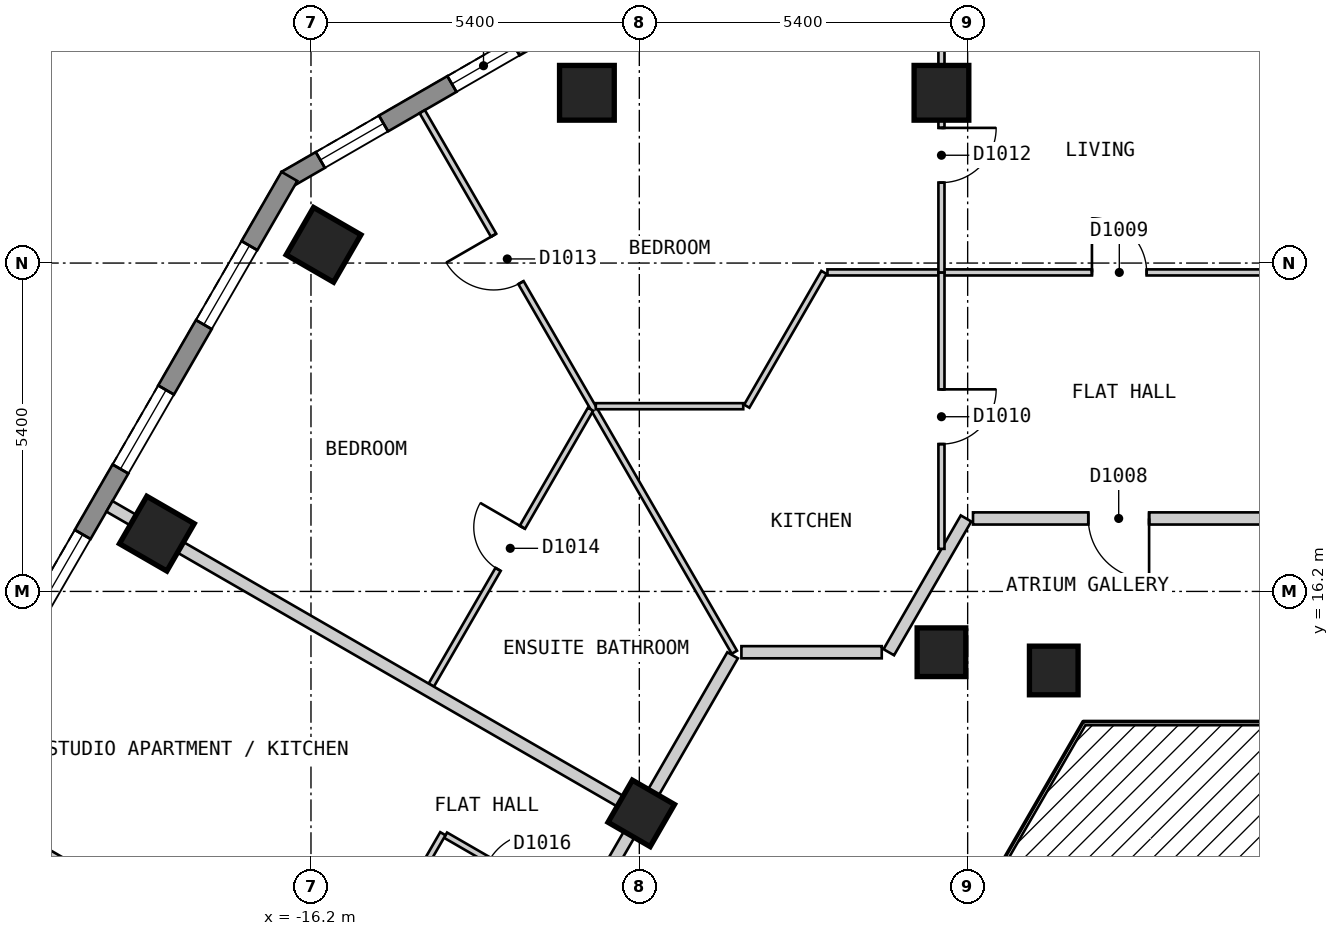
"""IFC4 building model, lengths in metres.
Left out: names, types, materials, properties, quantities, classifications, styles, units other than length and angle.
Written with IfcOpenShell. Run it as: python <this file> out.ifc"""

import sys

from ifc_helpers import new_model, si_unit, direction, frame, frame_2d, origin, origin_2d, place, context, subcontext, project, spatial, polyline, rectangle, outline, extrude, element, fill, save


model = new_model("IFC4")
c1 = context("Model", 3, precision=1e-05, world=origin(), true_north=direction((0.0, 1.0)))
c2 = subcontext(c1, "Body", "Model", "MODEL_VIEW")
j1 = project(units=[si_unit("LENGTHUNIT", "METRE"), si_unit("PLANEANGLEUNIT", "RADIAN")], contexts=[c1])
p1 = place(None, origin())
s1 = spatial("IfcSite", under=j1, at=p1, CompositionType="ELEMENT")
p2 = place(p1, origin())
s2 = spatial("IfcBuilding", under=s1, at=p2, CompositionType="ELEMENT")
p3 = place(p2, frame((0.0, 0.0, 126.6)))
s3 = spatial("IfcBuildingStorey", under=s2, at=p3, CompositionType="ELEMENT", Elevation=126.6)
for number, where, z_axis, x_axis in (
    (1, (-5.831, 24.4, 0.0), (0.0, 0.0, 1.0), (-1.0, 0.0, 0.0)),
    (2, (-11.662, 24.4, 0.0), (0.0, 0.0, 1.0), (-1.0, 0.0, 0.0)),
    (3, (-15.993, 21.9, 0.0), (0.0, 0.0, 1.0), (-0.5, -0.866, 0.0)),
    (4, (-18.735, 17.15, 0.0), (0.0, 0.0, 1.0), (-0.5, -0.866, 0.0)),
):
    element("IfcColumn", number, at=place(p3, frame(where, z_axis=z_axis, x_axis=x_axis)), inside=s3, PredefinedType="COLUMN", context=c2, shape_type="SweptSolid", body=[
        extrude(rectangle(XDim=0.9, YDim=0.9, at=origin_2d()), origin(), (0.0, 0.0, 1.0), 3.0),
    ])
for number, where, z_axis, x_axis in (
    (5, (-3.984, 14.9, 0.0), (0.0, 0.0, 1.0), (1.0, 0.0, 0.0)),
    (6, (-5.831, 15.2, 0.0), (0.0, 0.0, 1.0), (-1.0, 0.0, 0.0)),
    (7, (-10.768, 12.55, 0.0), (0.0, 0.0, 1.0), (-0.5, -0.866, 0.0)),
):
    element("IfcColumn", number, at=place(p3, frame(where, z_axis=z_axis, x_axis=x_axis)), inside=s3, PredefinedType="COLUMN", context=c2, shape_type="SweptSolid", body=[
        extrude(rectangle(XDim=0.8, YDim=0.8, at=origin_2d()), origin(), (0.0, 0.0, 1.0), 3.0),
    ])
p4 = place(p3, frame((-12.28, 25.47, 0.0), z_axis=(0.0, 0.0, 1.0), x_axis=(-0.866022959057, -0.500004234368, 0.0)))
e8 = element("IfcWall", 8, at=p4, inside=s3, PredefinedType="SOLIDWALL", context=c2, shape_type="SweptSolid", body=[
    extrude(outline(polyline([(0.0, -0.15), (5.0, -0.15), (4.92, 0.15), (0.08, 0.15), (0.0, -0.15)])), origin(), (0.0, 0.0, 1.0), 2.7),
])
p5 = place(p4, frame((0.65, 0.0, 0.15)))
e9 = element("IfcOpeningElement", 9, at=p5, cuts=e8, PredefinedType="OPENING", context=c2, shape_type="SweptSolid", body=[
    extrude(rectangle(XDim=1.2, YDim=2.1, at=frame_2d((0.6, 1.05))), frame((0.0, 0.16, 0.0), z_axis=(0.0, -1.0, 0.0), x_axis=(1.0, 0.0, 0.0)), (0.0, 0.0, 1.0), 0.32),
])
p6 = place(p4, frame((3.149, 0.0, 0.15)))
e10 = element("IfcOpeningElement", 10, at=p6, cuts=e8, PredefinedType="OPENING", context=c2, shape_type="SweptSolid", body=[
    extrude(rectangle(XDim=1.2, YDim=2.1, at=frame_2d((0.6, 1.05))), frame((0.0, 0.16, 0.0), z_axis=(0.0, -1.0, 0.0), x_axis=(1.0, 0.0, 0.0)), (0.0, 0.0, 1.0), 0.32),
])
p7 = place(p3, frame((-16.555, 23.025, 0.0), z_axis=(0.0, 0.0, 1.0), x_axis=(-0.500020536353, -0.866013546791, 0.0)))
e11 = element("IfcWall", 11, at=p7, inside=s3, PredefinedType="SOLIDWALL", context=c2, shape_type="SweptSolid", body=[
    extrude(outline(polyline([(0.0, -0.15), (23.325, -0.15), (23.245, 0.15), (0.08, 0.15), (0.0, -0.15)])), origin(), (0.0, 0.0, 1.0), 2.7),
])
p8 = place(p7, frame((1.314, 0.0, 0.15)))
e12 = element("IfcOpeningElement", 12, at=p8, cuts=e11, PredefinedType="OPENING", context=c2, shape_type="SweptSolid", body=[
    extrude(rectangle(XDim=1.5, YDim=2.1, at=frame_2d((0.75, 1.05))), frame((0.0, 0.16, 0.0), z_axis=(0.0, -1.0, 0.0), x_axis=(1.0, 0.0, 0.0)), (0.0, 0.0, 1.0), 0.32),
])
p9 = place(p7, frame((4.056, 0.0, 0.15)))
e13 = element("IfcOpeningElement", 13, at=p9, cuts=e11, PredefinedType="OPENING", context=c2, shape_type="SweptSolid", body=[
    extrude(rectangle(XDim=1.5, YDim=2.1, at=frame_2d((0.75, 1.05))), frame((0.0, 0.16, 0.0), z_axis=(0.0, -1.0, 0.0), x_axis=(1.0, 0.0, 0.0)), (0.0, 0.0, 1.0), 0.32),
])
p10 = place(p7, frame((6.799, 0.0, 0.15)))
e14 = element("IfcOpeningElement", 14, at=p10, cuts=e11, PredefinedType="OPENING", context=c2, shape_type="SweptSolid", body=[
    extrude(rectangle(XDim=1.5, YDim=2.1, at=frame_2d((0.75, 1.05))), frame((0.0, 0.16, 0.0), z_axis=(0.0, -1.0, 0.0), x_axis=(1.0, 0.0, 0.0)), (0.0, 0.0, 1.0), 0.32),
])
p11 = place(p7, frame((9.541, 0.0, 0.15)))
e15 = element("IfcOpeningElement", 15, at=p11, cuts=e11, PredefinedType="OPENING", context=c2, shape_type="SweptSolid", body=[
    extrude(rectangle(XDim=1.5, YDim=2.1, at=frame_2d((0.75, 1.05))), frame((0.0, 0.16, 0.0), z_axis=(0.0, -1.0, 0.0), x_axis=(1.0, 0.0, 0.0)), (0.0, 0.0, 1.0), 0.32),
])
p12 = place(p7, frame((12.285, 0.0, 0.15)))
e16 = element("IfcOpeningElement", 16, at=p12, cuts=e11, PredefinedType="OPENING", context=c2, shape_type="SweptSolid", body=[
    extrude(rectangle(XDim=1.5, YDim=2.1, at=frame_2d((0.75, 1.05))), frame((0.0, 0.16, 0.0), z_axis=(0.0, -1.0, 0.0), x_axis=(1.0, 0.0, 0.0)), (0.0, 0.0, 1.0), 0.32),
])
p13 = place(p7, frame((15.027, 0.0, 0.15)))
e17 = element("IfcOpeningElement", 17, at=p13, cuts=e11, PredefinedType="OPENING", context=c2, shape_type="SweptSolid", body=[
    extrude(rectangle(XDim=1.5, YDim=2.1, at=frame_2d((0.75, 1.05))), frame((0.0, 0.16, 0.0), z_axis=(0.0, -1.0, 0.0), x_axis=(1.0, 0.0, 0.0)), (0.0, 0.0, 1.0), 0.32),
])
p14 = place(p7, frame((17.769, 0.0, 0.15)))
e18 = element("IfcOpeningElement", 18, at=p14, cuts=e11, PredefinedType="OPENING", context=c2, shape_type="SweptSolid", body=[
    extrude(rectangle(XDim=1.5, YDim=2.1, at=frame_2d((0.75, 1.05))), frame((0.0, 0.16, 0.0), z_axis=(0.0, -1.0, 0.0), x_axis=(1.0, 0.0, 0.0)), (0.0, 0.0, 1.0), 0.32),
])
p15 = place(p7, frame((20.512, 0.0, 0.15)))
e19 = element("IfcOpeningElement", 19, at=p15, cuts=e11, PredefinedType="OPENING", context=c2, shape_type="SweptSolid", body=[
    extrude(rectangle(XDim=1.5, YDim=2.1, at=frame_2d((0.75, 1.05))), frame((0.0, 0.16, 0.0), z_axis=(0.0, -1.0, 0.0), x_axis=(1.0, 0.0, 0.0)), (0.0, 0.0, 1.0), 0.32),
])
p16 = place(p3, frame((-9.121, 15.2, 0.0), z_axis=(0.0, 0.0, 1.0), x_axis=(1.0, 0.0, 0.0)))
e20 = element("IfcWall", 20, at=p16, inside=s3, PredefinedType="PARTITIONING", context=c2, shape_type="SweptSolid", body=[
    extrude(rectangle(XDim=2.308, YDim=0.2, at=frame_2d((1.154, 0.0))), origin(), (0.0, 0.0, 1.0), 2.7),
])
p17 = place(p3, frame((-5.312, 17.4, 0.0), z_axis=(0.0, 0.0, 1.0), x_axis=(1.0, 0.0, 0.0)))
e21 = element("IfcWall", 21, at=p17, inside=s3, PredefinedType="PARTITIONING", context=c2, shape_type="SweptSolid", body=[
    extrude(rectangle(XDim=10.739, YDim=0.2, at=frame_2d((5.37, 0.0))), origin(), (0.0, 0.0, 1.0), 2.7),
])
p18 = place(p17, frame((1.896, 0.0, 0.0)))
e22 = element("IfcOpeningElement", 22, at=p18, cuts=e21, PredefinedType="OPENING", context=c2, shape_type="SweptSolid", body=[
    extrude(rectangle(XDim=1.0, YDim=2.1, at=frame_2d((0.5, 1.05))), frame((0.0, 0.11, 0.0), z_axis=(0.0, -1.0, 0.0), x_axis=(1.0, 0.0, 0.0)), (0.0, 0.0, 1.0), 0.22),
])
p19 = place(p3, frame((-6.697, 15.2, 0.0), z_axis=(0.0, 0.0, 1.0), x_axis=(0.499963722229, 0.866046347752, 0.0)))
e23 = element("IfcWall", 23, at=p19, inside=s3, PredefinedType="PARTITIONING", context=c2, shape_type="SweptSolid", body=[
    extrude(rectangle(XDim=2.54, YDim=0.2, at=frame_2d((1.27, 0.0))), origin(), (0.0, 0.0, 1.0), 2.7),
])
p20 = place(p3, frame((-17.753, 0.45, 0.0), z_axis=(0.0, 0.0, 1.0), x_axis=(0.499990970252, 0.866030617049, 0.0)))
e24 = element("IfcWall", 24, at=p20, inside=s3, PredefinedType="PARTITIONING", context=c2, shape_type="SweptSolid", body=[
    extrude(rectangle(XDim=16.974, YDim=0.2, at=frame_2d((8.487, 0.0))), origin(), (0.0, 0.0, 1.0), 2.7),
])
p21 = place(p20, frame((10.73, 0.0, 0.0)))
e25 = element("IfcOpeningElement", 25, at=p21, cuts=e24, PredefinedType="OPENING", context=c2, shape_type="SweptSolid", body=[
    extrude(rectangle(XDim=1.0, YDim=2.1, at=frame_2d((0.5, 1.05))), frame((0.0, 0.11, 0.0), z_axis=(0.0, -1.0, 0.0), x_axis=(1.0, 0.0, 0.0)), (0.0, 0.0, 1.0), 0.22),
])
p22 = place(p20, frame((5.245, 0.0, 0.0)))
e26 = element("IfcOpeningElement", 26, at=p22, cuts=e24, PredefinedType="OPENING", context=c2, shape_type="SweptSolid", body=[
    extrude(rectangle(XDim=1.0, YDim=2.1, at=frame_2d((0.5, 1.05))), frame((0.0, 0.11, 0.0), z_axis=(0.0, -1.0, 0.0), x_axis=(1.0, 0.0, 0.0)), (0.0, 0.0, 1.0), 0.22),
])
p23 = place(p20, frame((0.594, 0.0, 0.0)))
e27 = element("IfcOpeningElement", 27, at=p23, cuts=e24, PredefinedType="OPENING", context=c2, shape_type="SweptSolid", body=[
    extrude(rectangle(XDim=1.0, YDim=2.1, at=frame_2d((0.5, 1.05))), frame((0.0, 0.11, 0.0), z_axis=(0.0, -1.0, 0.0), x_axis=(1.0, 0.0, 0.0)), (0.0, 0.0, 1.0), 0.22),
])
p24 = place(p3, frame((-14.37, 24.09, 0.0), z_axis=(0.0, 0.0, 1.0), x_axis=(0.50002438799, -0.866011322914, 0.0)))
e28 = element("IfcWall", 28, at=p24, inside=s3, PredefinedType="PARTITIONING", context=c2, shape_type="SweptSolid", body=[
    extrude(rectangle(XDim=10.266, YDim=0.1, at=frame_2d((5.133, 0.0))), origin(), (0.0, 0.0, 1.0), 2.7),
])
p25 = place(p24, frame((2.347, 0.0, 0.0)))
e29 = element("IfcOpeningElement", 29, at=p25, cuts=e28, PredefinedType="OPENING", context=c2, shape_type="SweptSolid", body=[
    extrude(rectangle(XDim=0.9, YDim=2.1, at=frame_2d((0.45, 1.05))), frame((0.0, 0.06, 0.0), z_axis=(0.0, -1.0, 0.0), x_axis=(1.0, 0.0, 0.0)), (0.0, 0.0, 1.0), 0.12),
])
p26 = place(p3, frame((-13.987, 12.192, 0.0), z_axis=(0.0, 0.0, 1.0), x_axis=(0.865983051302, -0.500073349477, 0.0)))
e30 = element("IfcWall", 30, at=p26, inside=s3, PredefinedType="PARTITIONING", context=c2, shape_type="SweptSolid", body=[
    extrude(rectangle(XDim=2.509, YDim=0.1, at=frame_2d((1.255, 0.0))), origin(), (0.0, 0.0, 1.0), 2.7),
])
p27 = place(p26, frame((0.829, 0.0, 0.0)))
e31 = element("IfcOpeningElement", 31, at=p27, cuts=e30, PredefinedType="OPENING", context=c2, shape_type="SweptSolid", body=[
    extrude(rectangle(XDim=0.9, YDim=2.1, at=frame_2d((0.45, 1.05))), frame((0.0, 0.06, 0.0), z_axis=(0.0, -1.0, 0.0), x_axis=(1.0, 0.0, 0.0)), (0.0, 0.0, 1.0), 0.12),
])
p28 = place(p3, frame((-11.516, 19.246, 0.0), z_axis=(0.0, 0.0, 1.0), x_axis=(1.0, 0.0, 0.0)))
e32 = element("IfcWall", 32, at=p28, inside=s3, PredefinedType="PARTITIONING", context=c2, shape_type="SweptSolid", body=[
    extrude(rectangle(XDim=2.425, YDim=0.1, at=frame_2d((1.212, 0.0))), origin(), (0.0, 0.0, 1.0), 2.7),
])
p29 = place(p3, frame((-7.706, 21.446, 0.0), z_axis=(0.0, 0.0, 1.0), x_axis=(1.0, 0.0, 0.0)))
e33 = element("IfcWall", 33, at=p29, inside=s3, PredefinedType="PARTITIONING", context=c2, shape_type="SweptSolid", body=[
    extrude(rectangle(XDim=13.537, YDim=0.1, at=frame_2d((6.769, 0.0))), origin(), (0.0, 0.0, 1.0), 2.7),
])
p30 = place(p29, frame((4.35, 0.0, 0.0)))
e34 = element("IfcOpeningElement", 34, at=p30, cuts=e33, PredefinedType="OPENING", context=c2, shape_type="SweptSolid", body=[
    extrude(rectangle(XDim=0.9, YDim=2.1, at=frame_2d((0.45, 1.05))), frame((0.0, 0.06, 0.0), z_axis=(0.0, -1.0, 0.0), x_axis=(1.0, 0.0, 0.0)), (0.0, 0.0, 1.0), 0.12),
])
p31 = place(p3, frame((-9.033, 19.246, 0.0), z_axis=(0.0, 0.0, 1.0), x_axis=(0.499963722229, 0.866046347752, 0.0)))
e35 = element("IfcWall", 35, at=p31, inside=s3, PredefinedType="PARTITIONING", context=c2, shape_type="SweptSolid", body=[
    extrude(rectangle(XDim=2.54, YDim=0.1, at=frame_2d((1.27, 0.0))), origin(), (0.0, 0.0, 1.0), 2.7),
])
p32 = place(p3, frame((-15.763, 9.217, 0.0), z_axis=(0.0, 0.0, 1.0), x_axis=(0.500096714907, 0.865969558206, 0.0)))
e36 = element("IfcWall", 36, at=p32, inside=s3, PredefinedType="PARTITIONING", context=c2, shape_type="SweptSolid", body=[
    extrude(rectangle(XDim=3.463, YDim=0.1, at=frame_2d((1.731, 0.0))), origin(), (0.0, 0.0, 1.0), 2.7),
])
p33 = place(p3, frame((-14.222, 14.659, 0.0), z_axis=(0.0, 0.0, 1.0), x_axis=(0.500053212623, 0.865994679283, 0.0)))
e37 = element("IfcWall", 37, at=p33, inside=s3, PredefinedType="PARTITIONING", context=c2, shape_type="SweptSolid", body=[
    extrude(rectangle(XDim=5.239, YDim=0.1, at=frame_2d((2.62, 0.0))), origin(), (0.0, 0.0, 1.0), 2.7),
])
p34 = place(p33, frame((2.198, 0.0, 0.0)))
e38 = element("IfcOpeningElement", 38, at=p34, cuts=e37, PredefinedType="OPENING", context=c2, shape_type="SweptSolid", body=[
    extrude(rectangle(XDim=0.8, YDim=2.1, at=frame_2d((0.4, 1.05))), frame((0.0, 0.06, 0.0), z_axis=(0.0, -1.0, 0.0), x_axis=(1.0, 0.0, 0.0)), (0.0, 0.0, 1.0), 0.12),
])
p35 = place(p3, frame((-5.831, 16.9, 0.0), z_axis=(0.0, 0.0, 1.0), x_axis=(0.0, 1.0, 0.0)))
e39 = element("IfcWall", 39, at=p35, inside=s3, PredefinedType="PARTITIONING", context=c2, shape_type="SweptSolid", body=[
    extrude(rectangle(XDim=4.546, YDim=0.1, at=frame_2d((2.273, 0.0))), origin(), (0.0, 0.0, 1.0), 2.7),
])
p36 = place(p35, frame((1.723, 0.0, 0.0)))
e40 = element("IfcOpeningElement", 40, at=p36, cuts=e39, PredefinedType="OPENING", context=c2, shape_type="SweptSolid", body=[
    extrude(rectangle(XDim=0.9, YDim=2.1, at=frame_2d((0.45, 1.05))), frame((0.0, 0.06, 0.0), z_axis=(0.0, -1.0, 0.0), x_axis=(1.0, 0.0, 0.0)), (0.0, 0.0, 1.0), 0.12),
])
p37 = place(p3, frame((-22.257, 12.85, 0.0), z_axis=(0.0, 0.0, 1.0), x_axis=(0.866047370643, -0.499961950354, 0.0)))
e41 = element("IfcWall", 41, at=p37, inside=s3, PredefinedType="PARTITIONING", context=c2, shape_type="SweptSolid", body=[
    extrude(rectangle(XDim=10.001, YDim=0.2, at=frame_2d((5.0, 0.0))), origin(), (0.0, 0.0, 1.0), 2.7),
])
p38 = place(p3, frame((-19.514, 17.599, 0.0), z_axis=(0.0, 0.0, 1.0), x_axis=(0.866059142644, -0.499941558027, 0.0)))
e42 = element("IfcWall", 42, at=p38, inside=s3, PredefinedType="PARTITIONING", context=c2, shape_type="SweptSolid", body=[
    extrude(rectangle(XDim=9.999, YDim=0.2, at=frame_2d((5.0, 0.0))), origin(), (0.0, 0.0, 1.0), 2.7),
])
p39 = place(p3, frame((-5.831, 21.446, 0.0), z_axis=(0.0, 0.0, 1.0), x_axis=(0.0, 1.0, 0.0)))
e43 = element("IfcWall", 43, at=p39, inside=s3, PredefinedType="PARTITIONING", context=c2, shape_type="SweptSolid", body=[
    extrude(rectangle(XDim=3.854, YDim=0.1, at=frame_2d((1.927, 0.0))), origin(), (0.0, 0.0, 1.0), 2.7),
])
p40 = place(p39, frame((1.477, 0.0, 0.0)))
e44 = element("IfcOpeningElement", 44, at=p40, cuts=e43, PredefinedType="OPENING", context=c2, shape_type="SweptSolid", body=[
    extrude(rectangle(XDim=0.9, YDim=2.1, at=frame_2d((0.45, 1.05))), frame((0.0, 0.06, 0.0), z_axis=(0.0, -1.0, 0.0), x_axis=(1.0, 0.0, 0.0)), (0.0, 0.0, 1.0), 0.12),
])
p41 = place(p5, origin())
e45 = element("IfcWindow", 45, at=p41, inside=s3, PartitioningType="SINGLE_PANEL", PredefinedType="WINDOW", context=c2, shape_type="SweptSolid", body=[
    extrude(rectangle(XDim=1.2, YDim=2.1, at=frame_2d((0.6, 1.05))), frame((0.0, 0.03, 0.0), z_axis=(0.0, -1.0, 0.0), x_axis=(1.0, 0.0, 0.0)), (0.0, 0.0, 1.0), 0.06),
])
fill(e9, e45)
p42 = place(p6, origin())
e46 = element("IfcWindow", 46, at=p42, inside=s3, PartitioningType="SINGLE_PANEL", PredefinedType="WINDOW", context=c2, shape_type="SweptSolid", body=[
    extrude(rectangle(XDim=1.2, YDim=2.1, at=frame_2d((0.6, 1.05))), frame((0.0, 0.03, 0.0), z_axis=(0.0, -1.0, 0.0), x_axis=(1.0, 0.0, 0.0)), (0.0, 0.0, 1.0), 0.06),
])
fill(e10, e46)
p43 = place(p8, origin())
e47 = element("IfcWindow", 47, at=p43, inside=s3, PartitioningType="SINGLE_PANEL", PredefinedType="WINDOW", context=c2, shape_type="SweptSolid", body=[
    extrude(rectangle(XDim=1.5, YDim=2.1, at=frame_2d((0.75, 1.05))), frame((0.0, 0.03, 0.0), z_axis=(0.0, -1.0, 0.0), x_axis=(1.0, 0.0, 0.0)), (0.0, 0.0, 1.0), 0.06),
])
fill(e12, e47)
p44 = place(p9, origin())
e48 = element("IfcWindow", 48, at=p44, inside=s3, PartitioningType="SINGLE_PANEL", PredefinedType="WINDOW", context=c2, shape_type="SweptSolid", body=[
    extrude(rectangle(XDim=1.5, YDim=2.1, at=frame_2d((0.75, 1.05))), frame((0.0, 0.03, 0.0), z_axis=(0.0, -1.0, 0.0), x_axis=(1.0, 0.0, 0.0)), (0.0, 0.0, 1.0), 0.06),
])
fill(e13, e48)
p45 = place(p10, origin())
e49 = element("IfcWindow", 49, at=p45, inside=s3, PartitioningType="SINGLE_PANEL", PredefinedType="WINDOW", context=c2, shape_type="SweptSolid", body=[
    extrude(rectangle(XDim=1.5, YDim=2.1, at=frame_2d((0.75, 1.05))), frame((0.0, 0.03, 0.0), z_axis=(0.0, -1.0, 0.0), x_axis=(1.0, 0.0, 0.0)), (0.0, 0.0, 1.0), 0.06),
])
fill(e14, e49)
p46 = place(p18, origin())
e50 = element("IfcDoor", 50, at=p46, inside=s3, OperationType="SINGLE_SWING_RIGHT", PredefinedType="DOOR", context=c2, shape_type="SweptSolid", body=[
    extrude(rectangle(XDim=1.0, YDim=2.1, at=frame_2d((0.5, 1.05))), frame((0.0, 0.025, 0.0), z_axis=(0.0, -1.0, 0.0), x_axis=(1.0, 0.0, 0.0)), (0.0, 0.0, 1.0), 0.05),
])
fill(e22, e50)
p47 = place(p30, origin())
e51 = element("IfcDoor", 51, at=p47, inside=s3, OperationType="SINGLE_SWING_LEFT", PredefinedType="DOOR", context=c2, shape_type="SweptSolid", body=[
    extrude(rectangle(XDim=0.9, YDim=2.1, at=frame_2d((0.45, 1.05))), frame((0.0, 0.025, 0.0), z_axis=(0.0, -1.0, 0.0), x_axis=(1.0, 0.0, 0.0)), (0.0, 0.0, 1.0), 0.05),
])
fill(e34, e51)
p48 = place(p36, origin())
e52 = element("IfcDoor", 52, at=p48, inside=s3, OperationType="SINGLE_SWING_RIGHT", PredefinedType="DOOR", context=c2, shape_type="SweptSolid", body=[
    extrude(rectangle(XDim=0.9, YDim=2.1, at=frame_2d((0.45, 1.05))), frame((0.0, 0.025, 0.0), z_axis=(0.0, -1.0, 0.0), x_axis=(1.0, 0.0, 0.0)), (0.0, 0.0, 1.0), 0.05),
])
fill(e40, e52)
p49 = place(p40, origin())
e53 = element("IfcDoor", 53, at=p49, inside=s3, OperationType="SINGLE_SWING_RIGHT", PredefinedType="DOOR", context=c2, shape_type="SweptSolid", body=[
    extrude(rectangle(XDim=0.9, YDim=2.1, at=frame_2d((0.45, 1.05))), frame((0.0, 0.025, 0.0), z_axis=(0.0, -1.0, 0.0), x_axis=(1.0, 0.0, 0.0)), (0.0, 0.0, 1.0), 0.05),
])
fill(e44, e53)
p50 = place(p25, origin())
e54 = element("IfcDoor", 54, at=p50, inside=s3, OperationType="SINGLE_SWING_LEFT", PredefinedType="DOOR", context=c2, shape_type="SweptSolid", body=[
    extrude(rectangle(XDim=0.9, YDim=2.1, at=frame_2d((0.45, 1.05))), frame((0.0, 0.025, 0.0), z_axis=(0.0, -1.0, 0.0), x_axis=(1.0, 0.0, 0.0)), (0.0, 0.0, 1.0), 0.05),
])
fill(e29, e54)
p51 = place(p34, origin())
e55 = element("IfcDoor", 55, at=p51, inside=s3, OperationType="SINGLE_SWING_RIGHT", PredefinedType="DOOR", context=c2, shape_type="SweptSolid", body=[
    extrude(rectangle(XDim=0.8, YDim=2.1, at=frame_2d((0.4, 1.05))), frame((0.0, 0.025, 0.0), z_axis=(0.0, -1.0, 0.0), x_axis=(1.0, 0.0, 0.0)), (0.0, 0.0, 1.0), 0.05),
])
fill(e38, e55)
save(model, sys.argv[1])
